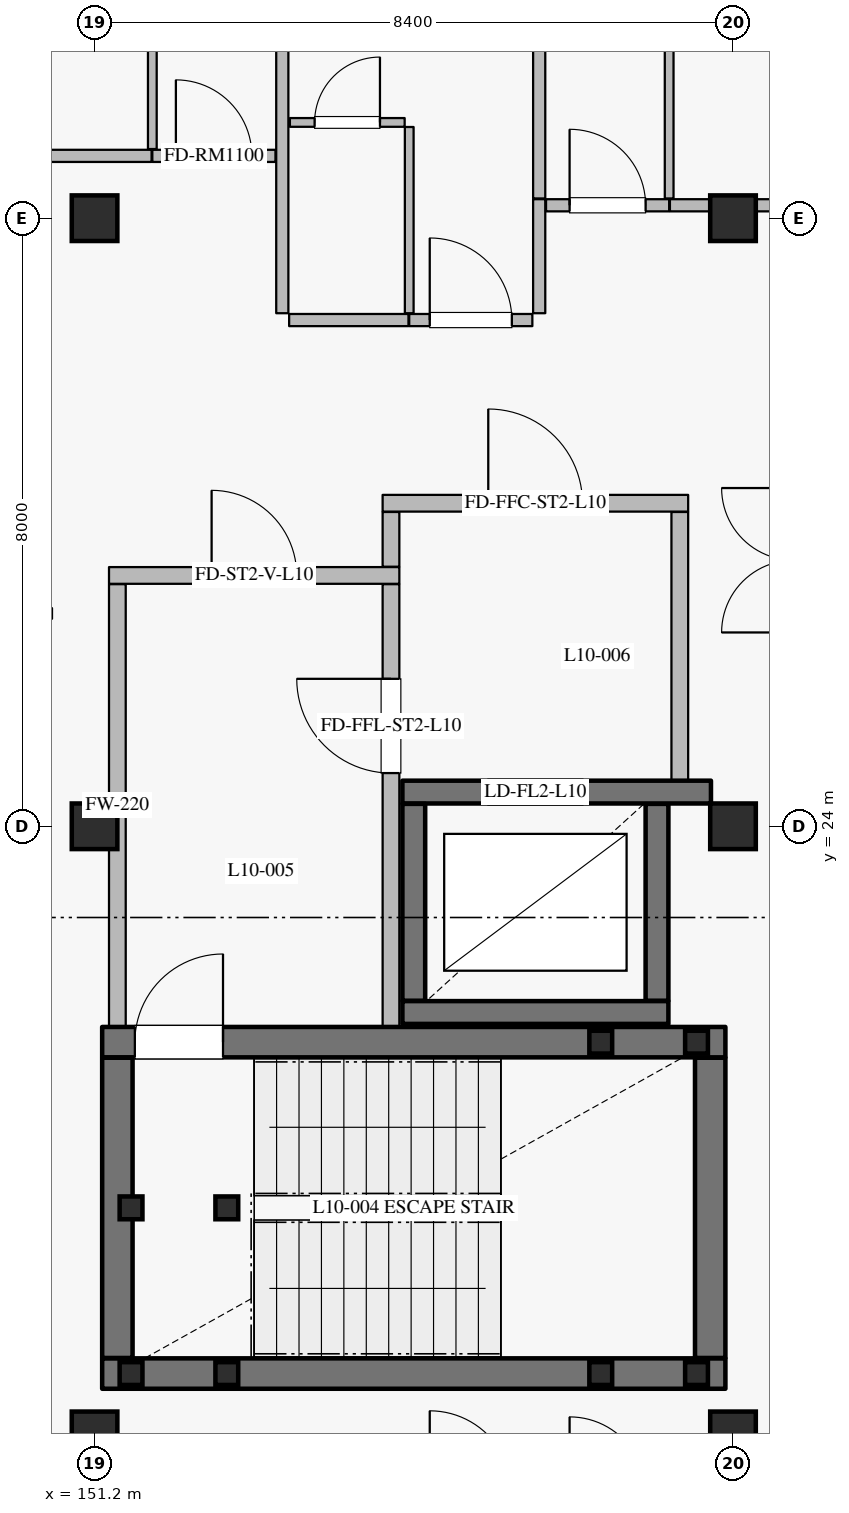
"""IFC4 building model, lengths in metres.
Left out: names, types, materials, properties, quantities, classifications, styles, units other than length and angle.
Written with IfcOpenShell. Run it as: python <this file> out.ifc"""

import sys

from ifc_helpers import new_model, si_unit, direction, frame, frame_2d, origin, origin_2d, place, context, subcontext, project, spatial, rectangle, hollow_rectangle, extrude, element, fill, save


model = new_model("IFC4")
c1 = context("Model", 3, precision=1e-05, world=origin(), true_north=direction((0.0, 1.0)))
c2 = subcontext(c1, "Body", "Model", "MODEL_VIEW")
j1 = project(units=[si_unit("LENGTHUNIT", "METRE"), si_unit("PLANEANGLEUNIT", "RADIAN")], contexts=[c1])
p1 = place(None, origin())
s1 = spatial("IfcSite", under=j1, at=p1, CompositionType="ELEMENT")
p2 = place(p1, origin())
s2 = spatial("IfcBuilding", under=s1, at=p2, CompositionType="ELEMENT")
p3 = place(p2, frame((0.0, 0.0, 43.2)))
s3 = spatial("IfcBuildingStorey", under=s2, at=p3, CompositionType="ELEMENT", Elevation=43.2)
for number, where, z_axis, x_axis in (
    (1, (151.2, 24.0, 0.0), (0.0, 0.0, 1.0), (1.0, 0.0, 0.0)),
    (2, (159.6, 24.0, 0.0), (0.0, 0.0, 1.0), (1.0, 0.0, 0.0)),
    (3, (151.2, 16.0, 0.0), (0.0, 0.0, 1.0), (1.0, 0.0, 0.0)),
    (4, (151.2, 32.0, 0.0), (0.0, 0.0, 1.0), (1.0, 0.0, 0.0)),
    (5, (159.6, 16.0, 0.0), (0.0, 0.0, 1.0), (1.0, 0.0, 0.0)),
    (6, (159.6, 32.0, 0.0), (0.0, 0.0, 1.0), (1.0, 0.0, 0.0)),
):
    element("IfcColumn", number, at=place(p3, frame(where, z_axis=z_axis, x_axis=x_axis)), inside=s3, PredefinedType="COLUMN", context=c2, shape_type="SweptSolid", body=[
        extrude(rectangle(XDim=0.6, YDim=0.6, at=origin_2d()), origin(), (0.0, 0.0, 1.0), 4.2),
    ])
p4 = place(p3, frame((143.1, 32.286, 0.0), z_axis=(0.0, 0.0, 1.0), x_axis=(0.724145477467, 0.689647248573, 0.0)))
e7 = element("IfcWall", 7, at=p4, inside=s3, PredefinedType="SOLIDWALL", context=c2, shape_type="SweptSolid", body=[
    extrude(rectangle(XDim=10.771, YDim=0.24, at=frame_2d((5.385, 0.0))), origin(), (0.0, 0.0, 1.0), 3.54),
])
p5 = place(p4, frame((1.914, 0.0, 0.8)))
e8 = element("IfcOpeningElement", 8, at=p5, cuts=e7, PredefinedType="OPENING", context=c2, shape_type="SweptSolid", body=[
    extrude(rectangle(XDim=2.0, YDim=1.75, at=frame_2d((1.0, 0.875))), frame((0.0, 0.13, 0.0), z_axis=(0.0, -1.0, 0.0), x_axis=(1.0, 0.0, 0.0)), (0.0, 0.0, 1.0), 0.26),
])
p6 = place(p4, frame((6.581, 0.0, 0.8)))
e9 = element("IfcOpeningElement", 9, at=p6, cuts=e7, PredefinedType="OPENING", context=c2, shape_type="SweptSolid", body=[
    extrude(rectangle(XDim=2.0, YDim=1.75, at=frame_2d((1.0, 0.875))), frame((0.0, 0.13, 0.0), z_axis=(0.0, -1.0, 0.0), x_axis=(1.0, 0.0, 0.0)), (0.0, 0.0, 1.0), 0.26),
])
p7 = place(p3, frame((155.25, 21.55, 0.0), z_axis=(0.0, 0.0, 1.0), x_axis=(1.0, 0.0, 0.0)))
e10 = element("IfcWall", 10, at=p7, inside=s3, PredefinedType="SHEAR", context=c2, shape_type="SweptSolid", body=[
    extrude(rectangle(XDim=3.5, YDim=0.3, at=frame_2d((1.75, 0.0))), origin(), (0.0, 0.0, 1.0), 3.935),
])
p8 = place(p3, frame((158.6, 21.705, 0.0), z_axis=(0.0, 0.0, 1.0), x_axis=(0.0, 1.0, 0.0)))
e11 = element("IfcWall", 11, at=p8, inside=s3, PredefinedType="SHEAR", context=c2, shape_type="SweptSolid", body=[
    extrude(rectangle(XDim=2.59, YDim=0.3, at=frame_2d((1.295, 0.0))), origin(), (0.0, 0.0, 1.0), 3.935),
])
p9 = place(p3, frame((159.31, 24.45, 0.0), z_axis=(0.0, 0.0, 1.0), x_axis=(-1.0, 0.0, 0.0)))
e12 = element("IfcWall", 12, at=p9, inside=s3, PredefinedType="SHEAR", context=c2, shape_type="SweptSolid", body=[
    extrude(rectangle(XDim=4.06, YDim=0.3, at=frame_2d((2.03, 0.0))), origin(), (0.0, 0.0, 1.0), 3.935),
])
p10 = place(p9, frame((1.685, 0.0, 0.0)))
e13 = element("IfcOpeningElement", 13, at=p10, cuts=e12, PredefinedType="OPENING", context=c2, shape_type="SweptSolid", body=[
    extrude(rectangle(XDim=1.25, YDim=2.25, at=frame_2d((0.625, 1.125))), frame((0.0, 0.16, 0.0), z_axis=(0.0, -1.0, 0.0), x_axis=(1.0, 0.0, 0.0)), (0.0, 0.0, 1.0), 0.32),
])
p11 = place(p3, frame((155.4, 24.295, 0.0), z_axis=(0.0, 0.0, 1.0), x_axis=(0.0, -1.0, 0.0)))
e14 = element("IfcWall", 14, at=p11, inside=s3, PredefinedType="SHEAR", context=c2, shape_type="SweptSolid", body=[
    extrude(rectangle(XDim=2.59, YDim=0.3, at=frame_2d((1.295, 0.0))), origin(), (0.0, 0.0, 1.0), 3.935),
])
p12 = place(p3, frame((151.3, 16.8, 0.0), z_axis=(0.0, 0.0, 1.0), x_axis=(1.0, 0.0, 0.0)))
e15 = element("IfcWall", 15, at=p12, inside=s3, PredefinedType="SHEAR", context=c2, shape_type="SweptSolid", body=[
    extrude(rectangle(XDim=8.2, YDim=0.4, at=frame_2d((4.1, 0.0))), origin(), (0.0, 0.0, 1.0), 3.935),
])
p13 = place(p3, frame((159.3, 17.005, 0.0), z_axis=(0.0, 0.0, 1.0), x_axis=(0.0, 1.0, 0.0)))
e16 = element("IfcWall", 16, at=p13, inside=s3, PredefinedType="SHEAR", context=c2, shape_type="SweptSolid", body=[
    extrude(rectangle(XDim=3.95, YDim=0.4, at=frame_2d((1.975, 0.0))), origin(), (0.0, 0.0, 1.0), 3.935),
])
p14 = place(p3, frame((151.3, 21.16, 0.0), z_axis=(0.0, 0.0, 1.0), x_axis=(1.0, 0.0, 0.0)))
e17 = element("IfcWall", 17, at=p14, inside=s3, PredefinedType="SHEAR", context=c2, shape_type="SweptSolid", body=[
    extrude(rectangle(XDim=8.2, YDim=0.4, at=frame_2d((4.1, 0.0))), origin(), (0.0, 0.0, 1.0), 3.935),
])
p15 = place(p14, frame((0.43, 0.0, 0.0)))
e18 = element("IfcOpeningElement", 18, at=p15, cuts=e17, PredefinedType="OPENING", context=c2, shape_type="SweptSolid", body=[
    extrude(rectangle(XDim=1.16, YDim=2.2, at=frame_2d((0.58, 1.1))), frame((0.0, 0.21, 0.0), z_axis=(0.0, -1.0, 0.0), x_axis=(1.0, 0.0, 0.0)), (0.0, 0.0, 1.0), 0.42),
])
p16 = place(p3, frame((151.5, 17.005, 0.0), z_axis=(0.0, 0.0, 1.0), x_axis=(0.0, 1.0, 0.0)))
e19 = element("IfcWall", 19, at=p16, inside=s3, PredefinedType="SHEAR", context=c2, shape_type="SweptSolid", body=[
    extrude(rectangle(XDim=3.95, YDim=0.4, at=frame_2d((1.975, 0.0))), origin(), (0.0, 0.0, 1.0), 3.935),
])
p17 = place(p3, frame((151.5, 21.365, 0.0), z_axis=(0.0, 0.0, 1.0), x_axis=(0.0, 1.0, 0.0)))
e20 = element("IfcWall", 20, at=p17, inside=s3, PredefinedType="PARTITIONING", context=c2, shape_type="SweptSolid", body=[
    extrude(rectangle(XDim=5.82, YDim=0.22, at=frame_2d((2.91, 0.0))), origin(), (0.0, 0.0, 1.0), 3.935),
])
p18 = place(p3, frame((151.39, 27.3, 0.0), z_axis=(0.0, 0.0, 1.0), x_axis=(1.0, 0.0, 0.0)))
e21 = element("IfcWall", 21, at=p18, inside=s3, PredefinedType="PARTITIONING", context=c2, shape_type="SweptSolid", body=[
    extrude(rectangle(XDim=3.82, YDim=0.22, at=frame_2d((1.91, 0.0))), origin(), (0.0, 0.0, 1.0), 3.935),
])
p19 = place(p18, frame((1.35, 0.0, 0.0)))
e22 = element("IfcOpeningElement", 22, at=p19, cuts=e21, PredefinedType="OPENING", context=c2, shape_type="SweptSolid", body=[
    extrude(rectangle(XDim=1.12, YDim=2.2, at=frame_2d((0.56, 1.1))), frame((0.0, 0.12, 0.0), z_axis=(0.0, -1.0, 0.0), x_axis=(1.0, 0.0, 0.0)), (0.0, 0.0, 1.0), 0.24),
])
p20 = place(p3, frame((155.1, 21.365, 0.0), z_axis=(0.0, 0.0, 1.0), x_axis=(0.0, 1.0, 0.0)))
e23 = element("IfcWall", 23, at=p20, inside=s3, PredefinedType="PARTITIONING", context=c2, shape_type="SweptSolid", body=[
    extrude(rectangle(XDim=5.82, YDim=0.22, at=frame_2d((2.91, 0.0))), origin(), (0.0, 0.0, 1.0), 3.935),
])
p21 = place(p20, frame((3.335, 0.0, 0.0)))
e24 = element("IfcOpeningElement", 24, at=p21, cuts=e23, PredefinedType="OPENING", context=c2, shape_type="SweptSolid", body=[
    extrude(rectangle(XDim=1.24, YDim=2.2, at=frame_2d((0.62, 1.1))), frame((0.0, 0.12, 0.0), z_axis=(0.0, -1.0, 0.0), x_axis=(1.0, 0.0, 0.0)), (0.0, 0.0, 1.0), 0.24),
])
p22 = place(p3, frame((155.1, 27.415, 0.0), z_axis=(0.0, 0.0, 1.0), x_axis=(0.0, 1.0, 0.0)))
e25 = element("IfcWall", 25, at=p22, inside=s3, PredefinedType="PARTITIONING", context=c2, shape_type="SweptSolid", body=[
    extrude(rectangle(XDim=0.72, YDim=0.22, at=frame_2d((0.36, 0.0))), origin(), (0.0, 0.0, 1.0), 3.935),
])
p23 = place(p3, frame((158.9, 24.605, 0.0), z_axis=(0.0, 0.0, 1.0), x_axis=(0.0, 1.0, 0.0)))
e26 = element("IfcWall", 26, at=p23, inside=s3, PredefinedType="PARTITIONING", context=c2, shape_type="SweptSolid", body=[
    extrude(rectangle(XDim=3.53, YDim=0.22, at=frame_2d((1.765, 0.0))), origin(), (0.0, 0.0, 1.0), 3.935),
])
p24 = place(p3, frame((154.99, 28.25, 0.0), z_axis=(0.0, 0.0, 1.0), x_axis=(1.0, 0.0, 0.0)))
e27 = element("IfcWall", 27, at=p24, inside=s3, PredefinedType="PARTITIONING", context=c2, shape_type="SweptSolid", body=[
    extrude(rectangle(XDim=4.02, YDim=0.22, at=frame_2d((2.01, 0.0))), origin(), (0.0, 0.0, 1.0), 3.935),
])
p25 = place(p24, frame((1.39, 0.0, 0.0)))
e28 = element("IfcOpeningElement", 28, at=p25, cuts=e27, PredefinedType="OPENING", context=c2, shape_type="SweptSolid", body=[
    extrude(rectangle(XDim=1.24, YDim=2.2, at=frame_2d((0.62, 1.1))), frame((0.0, 0.12, 0.0), z_axis=(0.0, -1.0, 0.0), x_axis=(1.0, 0.0, 0.0)), (0.0, 0.0, 1.0), 0.24),
])
for number, where, z_axis, x_axis in (
    (29, (151.68, 16.8, 0.0), (0.0, 0.0, 1.0), (1.0, 0.0, 0.0)),
    (30, (151.68, 18.98, 0.0), (0.0, 0.0, 1.0), (1.0, 0.0, 0.0)),
    (31, (152.94, 16.8, 0.0), (0.0, 0.0, 1.0), (1.0, 0.0, 0.0)),
    (32, (152.94, 18.98, 0.0), (0.0, 0.0, 1.0), (1.0, 0.0, 0.0)),
):
    element("IfcColumn", number, at=place(p3, frame(where, z_axis=z_axis, x_axis=x_axis)), inside=s3, PredefinedType="COLUMN", context=c2, shape_type="SweptSolid", body=[
        extrude(hollow_rectangle(XDim=0.3, YDim=0.3, WallThickness=0.012, at=origin_2d()), origin(), (0.0, 0.0, 1.0), 4.02),
    ])
for number, where, z_axis, x_axis in (
    (33, (157.86, 16.8, -1.8), (0.0, 0.0, 1.0), (1.0, 0.0, 0.0)),
    (34, (157.86, 21.16, -1.8), (0.0, 0.0, 1.0), (1.0, 0.0, 0.0)),
    (35, (159.12, 16.8, -1.8), (0.0, 0.0, 1.0), (1.0, 0.0, 0.0)),
    (36, (159.12, 21.16, -1.8), (0.0, 0.0, 1.0), (1.0, 0.0, 0.0)),
):
    element("IfcColumn", number, at=place(p3, frame(where, z_axis=z_axis, x_axis=x_axis)), inside=s3, PredefinedType="COLUMN", context=c2, shape_type="SweptSolid", body=[
        extrude(hollow_rectangle(XDim=0.3, YDim=0.3, WallThickness=0.012, at=origin_2d()), origin(), (0.0, 0.0, 1.0), 3.72),
    ])
p26 = place(p3, frame((150.37, 32.82, 0.0), z_axis=(0.0, 0.0, 1.0), x_axis=(1.0, 0.0, 0.0)))
e37 = element("IfcWall", 37, at=p26, inside=s3, PredefinedType="PARTITIONING", context=c2, shape_type="SweptSolid", body=[
    extrude(rectangle(XDim=1.58, YDim=0.16, at=frame_2d((0.79, 0.0))), origin(), (0.0, 0.0, 1.0), 3.935),
])
p27 = place(p3, frame((151.96, 32.82, 0.0), z_axis=(0.0, 0.0, 1.0), x_axis=(1.0, 0.0, 0.0)))
e38 = element("IfcWall", 38, at=p27, inside=s3, PredefinedType="PARTITIONING", context=c2, shape_type="SweptSolid", body=[
    extrude(rectangle(XDim=1.62, YDim=0.16, at=frame_2d((0.81, 0.0))), origin(), (0.0, 0.0, 1.0), 3.935),
])
p28 = place(p27, frame((0.31, 0.0, 0.0)))
e39 = element("IfcOpeningElement", 39, at=p28, cuts=e38, PredefinedType="OPENING", context=c2, shape_type="SweptSolid", body=[
    extrude(rectangle(XDim=1.0, YDim=2.25, at=frame_2d((0.5, 1.125))), frame((0.0, 0.09, 0.0), z_axis=(0.0, -1.0, 0.0), x_axis=(1.0, 0.0, 0.0)), (0.0, 0.0, 1.0), 0.18),
])
p29 = place(p3, frame((151.96, 32.91, 0.0), z_axis=(0.0, 0.0, 1.0), x_axis=(0.0, 1.0, 0.0)))
e40 = element("IfcWall", 40, at=p29, inside=s3, PredefinedType="PARTITIONING", context=c2, shape_type="SweptSolid", body=[
    extrude(rectangle(XDim=2.45, YDim=0.115, at=frame_2d((1.225, 0.0))), origin(), (0.0, 0.0, 1.0), 3.935),
])
p30 = place(p3, frame((153.76, 30.66, 0.0), z_axis=(0.0, 0.0, 1.0), x_axis=(1.0, 0.0, 0.0)))
e41 = element("IfcWall", 41, at=p30, inside=s3, PredefinedType="PARTITIONING", context=c2, shape_type="SweptSolid", body=[
    extrude(rectangle(XDim=1.57, YDim=0.16, at=frame_2d((0.785, 0.0))), origin(), (0.0, 0.0, 1.0), 3.935),
])
p31 = place(p3, frame((155.34, 30.66, 0.0), z_axis=(0.0, 0.0, 1.0), x_axis=(1.0, 0.0, 0.0)))
e42 = element("IfcWall", 42, at=p31, inside=s3, PredefinedType="PARTITIONING", context=c2, shape_type="SweptSolid", body=[
    extrude(rectangle(XDim=1.62, YDim=0.16, at=frame_2d((0.81, 0.0))), origin(), (0.0, 0.0, 1.0), 3.935),
])
p32 = place(p31, frame((0.27, 0.0, 0.0)))
e43 = element("IfcOpeningElement", 43, at=p32, cuts=e42, PredefinedType="OPENING", context=c2, shape_type="SweptSolid", body=[
    extrude(rectangle(XDim=1.08, YDim=2.3, at=frame_2d((0.54, 1.15))), frame((0.0, 0.09, 0.0), z_axis=(0.0, -1.0, 0.0), x_axis=(1.0, 0.0, 0.0)), (0.0, 0.0, 1.0), 0.18),
])
p33 = place(p3, frame((155.34, 30.75, 0.0), z_axis=(0.0, 0.0, 1.0), x_axis=(0.0, 1.0, 0.0)))
e44 = element("IfcWall", 44, at=p33, inside=s3, PredefinedType="PARTITIONING", context=c2, shape_type="SweptSolid", body=[
    extrude(rectangle(XDim=2.45, YDim=0.115, at=frame_2d((1.225, 0.0))), origin(), (0.0, 0.0, 1.0), 3.935),
])
p34 = place(p3, frame((153.77, 33.26, 0.0), z_axis=(0.0, 0.0, 1.0), x_axis=(1.0, 0.0, 0.0)))
e45 = element("IfcWall", 45, at=p34, inside=s3, PredefinedType="PARTITIONING", context=c2, shape_type="SweptSolid", body=[
    extrude(rectangle(XDim=1.51, YDim=0.115, at=frame_2d((0.755, 0.0))), origin(), (0.0, 0.0, 1.0), 3.935),
])
p35 = place(p34, frame((0.325, 0.0, 0.0)))
e46 = element("IfcOpeningElement", 46, at=p35, cuts=e45, PredefinedType="OPENING", context=c2, shape_type="SweptSolid", body=[
    extrude(rectangle(XDim=0.86, YDim=2.12, at=frame_2d((0.43, 1.06))), frame((0.0, 0.067, 0.0), z_axis=(0.0, -1.0, 0.0), x_axis=(1.0, 0.0, 0.0)), (0.0, 0.0, 1.0), 0.135),
])
p36 = place(p3, frame((153.67, 30.75, 0.0), z_axis=(0.0, 0.0, 1.0), x_axis=(0.0, 1.0, 0.0)))
e47 = element("IfcWall", 47, at=p36, inside=s3, PredefinedType="PARTITIONING", context=c2, shape_type="SweptSolid", body=[
    extrude(rectangle(XDim=8.91, YDim=0.16, at=frame_2d((4.455, 0.0))), origin(), (0.0, 0.0, 1.0), 3.935),
])
p37 = place(p3, frame((157.05, 30.75, 0.0), z_axis=(0.0, 0.0, 1.0), x_axis=(0.0, 1.0, 0.0)))
e48 = element("IfcWall", 48, at=p37, inside=s3, PredefinedType="PARTITIONING", context=c2, shape_type="SweptSolid", body=[
    extrude(rectangle(XDim=1.5, YDim=0.16, at=frame_2d((0.75, 0.0))), origin(), (0.0, 0.0, 1.0), 3.935),
])
p38 = place(p3, frame((157.14, 32.17, 0.0), z_axis=(0.0, 0.0, 1.0), x_axis=(1.0, 0.0, 0.0)))
e49 = element("IfcWall", 49, at=p38, inside=s3, PredefinedType="PARTITIONING", context=c2, shape_type="SweptSolid", body=[
    extrude(rectangle(XDim=1.62, YDim=0.16, at=frame_2d((0.81, 0.0))), origin(), (0.0, 0.0, 1.0), 3.39),
])
p39 = place(p38, frame((0.31, 0.0, 0.0)))
e50 = element("IfcOpeningElement", 50, at=p39, cuts=e49, PredefinedType="OPENING", context=c2, shape_type="SweptSolid", body=[
    extrude(rectangle(XDim=1.0, YDim=2.25, at=frame_2d((0.5, 1.125))), frame((0.0, 0.09, 0.0), z_axis=(0.0, -1.0, 0.0), x_axis=(1.0, 0.0, 0.0)), (0.0, 0.0, 1.0), 0.18),
])
p40 = place(p3, frame((158.77, 32.17, 0.0), z_axis=(0.0, 0.0, 1.0), x_axis=(1.0, 0.0, 0.0)))
e51 = element("IfcWall", 51, at=p40, inside=s3, PredefinedType="PARTITIONING", context=c2, shape_type="SweptSolid", body=[
    extrude(rectangle(XDim=0.534, YDim=0.16, at=frame_2d((0.267, 0.0))), origin(), (0.0, 0.0, 1.0), 3.39),
])
p41 = place(p3, frame((158.76, 32.26, 0.0), z_axis=(0.0, 0.0, 1.0), x_axis=(0.0, 1.0, 0.0)))
e52 = element("IfcWall", 52, at=p41, inside=s3, PredefinedType="PARTITIONING", context=c2, shape_type="SweptSolid", body=[
    extrude(rectangle(XDim=2.45, YDim=0.115, at=frame_2d((1.225, 0.0))), origin(), (0.0, 0.0, 1.0), 3.935),
])
p42 = place(p3, frame((157.05, 32.26, 0.0), z_axis=(0.0, 0.0, 1.0), x_axis=(0.0, 1.0, 0.0)))
e53 = element("IfcWall", 53, at=p42, inside=s3, PredefinedType="PARTITIONING", context=c2, shape_type="SweptSolid", body=[
    extrude(rectangle(XDim=7.4, YDim=0.16, at=frame_2d((3.7, 0.0))), origin(), (0.0, 0.0, 1.0), 3.935),
])
p43 = place(p3, frame((159.304, 32.17, 0.0), z_axis=(0.0, 0.0, 1.0), x_axis=(1.0, 0.0, 0.0)))
e54 = element("IfcWall", 54, at=p43, inside=s3, PredefinedType="PARTITIONING", context=c2, shape_type="SweptSolid", body=[
    extrude(rectangle(XDim=1.036, YDim=0.16, at=frame_2d((0.518, 0.0))), origin(), (0.0, 0.0, 1.0), 3.935),
])
p44 = place(p10, origin())
e55 = element("IfcDoor", 55, at=p44, inside=s3, OperationType="DOUBLE_DOOR_SLIDING", PredefinedType="DOOR", context=c2, shape_type="SweptSolid", body=[
    extrude(rectangle(XDim=1.25, YDim=2.25, at=frame_2d((0.625, 1.125))), frame((0.0, 0.025, 0.0), z_axis=(0.0, -1.0, 0.0), x_axis=(1.0, 0.0, 0.0)), (0.0, 0.0, 1.0), 0.05),
])
fill(e13, e55)
p45 = place(p15, origin())
e56 = element("IfcDoor", 56, at=p45, inside=s3, OperationType="SINGLE_SWING_RIGHT", PredefinedType="DOOR", context=c2, shape_type="SweptSolid", body=[
    extrude(rectangle(XDim=1.16, YDim=2.2, at=frame_2d((0.58, 1.1))), frame((0.0, 0.025, 0.0), z_axis=(0.0, -1.0, 0.0), x_axis=(1.0, 0.0, 0.0)), (0.0, 0.0, 1.0), 0.05),
])
fill(e18, e56)
p46 = place(p19, origin())
e57 = element("IfcDoor", 57, at=p46, inside=s3, OperationType="SINGLE_SWING_LEFT", PredefinedType="DOOR", context=c2, shape_type="SweptSolid", body=[
    extrude(rectangle(XDim=1.12, YDim=2.2, at=frame_2d((0.56, 1.1))), frame((0.0, 0.025, 0.0), z_axis=(0.0, -1.0, 0.0), x_axis=(1.0, 0.0, 0.0)), (0.0, 0.0, 1.0), 0.05),
])
fill(e22, e57)
p47 = place(p21, origin())
e58 = element("IfcDoor", 58, at=p47, inside=s3, OperationType="SINGLE_SWING_RIGHT", PredefinedType="DOOR", context=c2, shape_type="SweptSolid", body=[
    extrude(rectangle(XDim=1.24, YDim=2.2, at=frame_2d((0.62, 1.1))), frame((0.0, 0.025, 0.0), z_axis=(0.0, -1.0, 0.0), x_axis=(1.0, 0.0, 0.0)), (0.0, 0.0, 1.0), 0.05),
])
fill(e24, e58)
p48 = place(p25, origin())
e59 = element("IfcDoor", 59, at=p48, inside=s3, OperationType="SINGLE_SWING_LEFT", PredefinedType="DOOR", context=c2, shape_type="SweptSolid", body=[
    extrude(rectangle(XDim=1.24, YDim=2.2, at=frame_2d((0.62, 1.1))), frame((0.0, 0.025, 0.0), z_axis=(0.0, -1.0, 0.0), x_axis=(1.0, 0.0, 0.0)), (0.0, 0.0, 1.0), 0.05),
])
fill(e28, e59)
p49 = place(p28, origin())
e60 = element("IfcDoor", 60, at=p49, inside=s3, OperationType="SINGLE_SWING_LEFT", PredefinedType="DOOR", context=c2, shape_type="SweptSolid", body=[
    extrude(rectangle(XDim=1.0, YDim=2.25, at=frame_2d((0.5, 1.125))), frame((0.0, 0.025, 0.0), z_axis=(0.0, -1.0, 0.0), x_axis=(1.0, 0.0, 0.0)), (0.0, 0.0, 1.0), 0.05),
])
fill(e39, e60)
p50 = place(p32, origin())
e61 = element("IfcDoor", 61, at=p50, inside=s3, OperationType="SINGLE_SWING_LEFT", PredefinedType="DOOR", context=c2, shape_type="SweptSolid", body=[
    extrude(rectangle(XDim=1.08, YDim=2.3, at=frame_2d((0.54, 1.15))), frame((0.0, 0.025, 0.0), z_axis=(0.0, -1.0, 0.0), x_axis=(1.0, 0.0, 0.0)), (0.0, 0.0, 1.0), 0.05),
])
fill(e43, e61)
p51 = place(p35, origin())
e62 = element("IfcDoor", 62, at=p51, inside=s3, OperationType="SINGLE_SWING_RIGHT", PredefinedType="DOOR", context=c2, shape_type="SweptSolid", body=[
    extrude(rectangle(XDim=0.86, YDim=2.12, at=frame_2d((0.43, 1.06))), frame((0.0, 0.025, 0.0), z_axis=(0.0, -1.0, 0.0), x_axis=(1.0, 0.0, 0.0)), (0.0, 0.0, 1.0), 0.05),
])
fill(e46, e62)
p52 = place(p39, origin())
e63 = element("IfcDoor", 63, at=p52, inside=s3, OperationType="SINGLE_SWING_LEFT", PredefinedType="DOOR", context=c2, shape_type="SweptSolid", body=[
    extrude(rectangle(XDim=1.0, YDim=2.25, at=frame_2d((0.5, 1.125))), frame((0.0, 0.025, 0.0), z_axis=(0.0, -1.0, 0.0), x_axis=(1.0, 0.0, 0.0)), (0.0, 0.0, 1.0), 0.05),
])
fill(e50, e63)
save(model, sys.argv[1])
